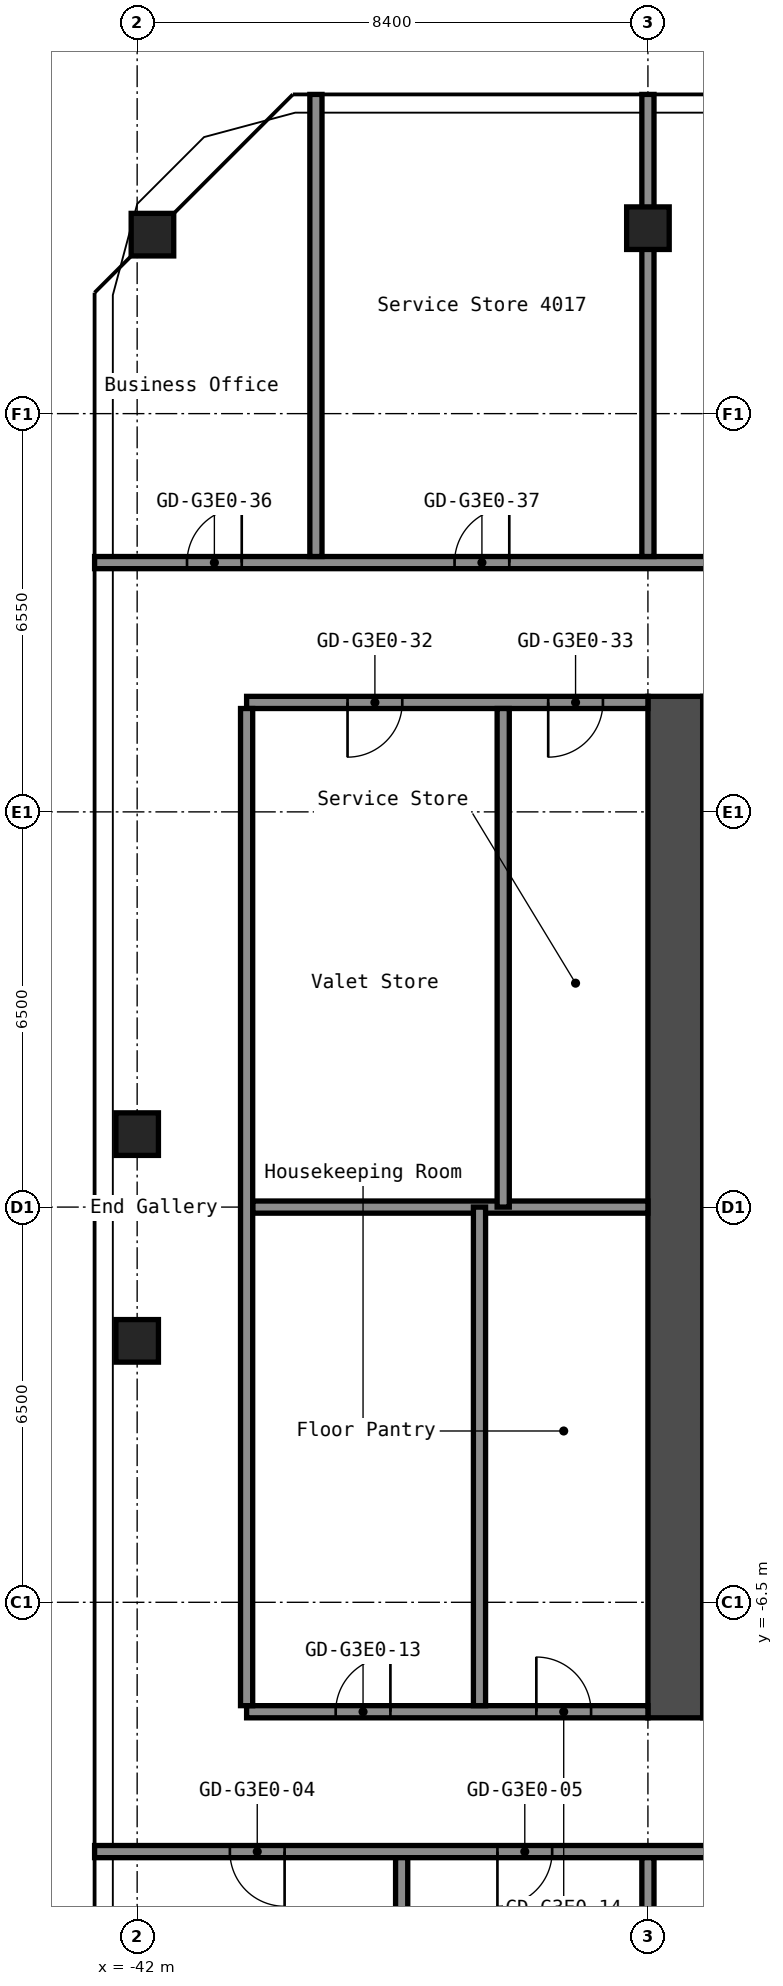
"""IFC4 building model, lengths in metres.
Left out: names, types, materials, properties, quantities, classifications, styles, units other than length and angle.
Written with IfcOpenShell. Run it as: python <this file> out.ifc"""

import sys

from ifc_helpers import new_model, si_unit, direction, frame, frame_2d, origin, origin_2d, place, context, subcontext, project, spatial, rectangle, hollow_rectangle, extrude, element, fill, save


model = new_model("IFC4")
c1 = context("Model", 3, precision=1e-05, world=origin(), true_north=direction((0.0, 1.0)))
c2 = subcontext(c1, "Body", "Model", "MODEL_VIEW")
j1 = project(units=[si_unit("LENGTHUNIT", "METRE"), si_unit("PLANEANGLEUNIT", "RADIAN")], contexts=[c1])
p1 = place(None, origin())
s1 = spatial("IfcSite", under=j1, at=p1, CompositionType="ELEMENT")
p2 = place(p1, origin())
s2 = spatial("IfcBuilding", under=s1, at=p2, CompositionType="ELEMENT")
p3 = place(p2, frame((0.0, 0.0, 143.8)))
s3 = spatial("IfcBuildingStorey", under=s2, at=p3, CompositionType="ELEMENT", Elevation=143.8)
for number, where, z_axis, x_axis in (
    (1, (-42.0, -2.2, 0.0), (0.0, 0.0, 1.0), (1.0, 0.0, 0.0)),
    (2, (-42.0, 1.2, 0.0), (0.0, 0.0, 1.0), (1.0, 0.0, 0.0)),
    (3, (-41.749, 15.994, 0.0), (0.0, 0.0, 1.0), (1.0, 0.0, 0.0)),
    (4, (-33.6, 16.1, 0.0), (0.0, 0.0, 1.0), (1.0, 0.0, 0.0)),
):
    element("IfcColumn", number, at=place(p3, frame(where, z_axis=z_axis, x_axis=x_axis)), inside=s3, PredefinedType="COLUMN", context=c2, shape_type="SweptSolid", body=[
        extrude(hollow_rectangle(XDim=0.7, YDim=0.7, WallThickness=0.028, at=origin_2d()), origin(), (0.0, 0.0, 1.0), 2.75),
    ])
p4 = place(p3, frame((-33.15, -8.4, 0.0), z_axis=(0.0, 0.0, 1.0), x_axis=(0.0, 1.0, 0.0)))
e5 = element("IfcWall", 5, at=p4, inside=s3, PredefinedType="SHEAR", context=c2, shape_type="SweptSolid", body=[
    extrude(rectangle(XDim=16.8, YDim=0.9, at=frame_2d((8.4, 0.0))), origin(), (0.0, 0.0, 1.0), 2.75),
])
p5 = place(p3, frame((-42.7, -10.6, 0.0), z_axis=(0.0, 0.0, 1.0), x_axis=(1.0, 0.0, 0.0)))
e6 = element("IfcWall", 6, at=p5, inside=s3, PredefinedType="PARTITIONING", context=c2, shape_type="SweptSolid", body=[
    extrude(rectangle(XDim=25.9, YDim=0.2, at=frame_2d((12.95, 0.0))), origin(), (0.0, 0.0, 1.0), 2.75),
])
p6 = place(p5, frame((2.225, 0.0, 0.0)))
e7 = element("IfcOpeningElement", 7, at=p6, cuts=e6, PredefinedType="OPENING", context=c2, shape_type="SweptSolid", body=[
    extrude(rectangle(XDim=0.9, YDim=2.1, at=frame_2d((0.45, 1.05))), frame((0.0, 0.11, 0.0), z_axis=(0.0, -1.0, 0.0), x_axis=(1.0, 0.0, 0.0)), (0.0, 0.0, 1.0), 0.22),
])
p7 = place(p5, frame((6.625, 0.0, 0.0)))
e8 = element("IfcOpeningElement", 8, at=p7, cuts=e6, PredefinedType="OPENING", context=c2, shape_type="SweptSolid", body=[
    extrude(rectangle(XDim=0.9, YDim=2.1, at=frame_2d((0.45, 1.05))), frame((0.0, 0.11, 0.0), z_axis=(0.0, -1.0, 0.0), x_axis=(1.0, 0.0, 0.0)), (0.0, 0.0, 1.0), 0.22),
])
p8 = place(p5, frame((11.0, 0.0, 0.0)))
e9 = element("IfcOpeningElement", 9, at=p8, cuts=e6, PredefinedType="OPENING", context=c2, shape_type="SweptSolid", body=[
    extrude(rectangle(XDim=0.9, YDim=2.1, at=frame_2d((0.45, 1.05))), frame((0.0, 0.11, 0.0), z_axis=(0.0, -1.0, 0.0), x_axis=(1.0, 0.0, 0.0)), (0.0, 0.0, 1.0), 0.22),
])
p9 = place(p5, frame((15.2, 0.0, 0.0)))
e10 = element("IfcOpeningElement", 10, at=p9, cuts=e6, PredefinedType="OPENING", context=c2, shape_type="SweptSolid", body=[
    extrude(rectangle(XDim=0.9, YDim=2.1, at=frame_2d((0.45, 1.05))), frame((0.0, 0.11, 0.0), z_axis=(0.0, -1.0, 0.0), x_axis=(1.0, 0.0, 0.0)), (0.0, 0.0, 1.0), 0.22),
])
p10 = place(p5, frame((19.655, 0.0, 0.0)))
e11 = element("IfcOpeningElement", 11, at=p10, cuts=e6, PredefinedType="OPENING", context=c2, shape_type="SweptSolid", body=[
    extrude(rectangle(XDim=0.9, YDim=2.1, at=frame_2d((0.45, 1.05))), frame((0.0, 0.11, 0.0), z_axis=(0.0, -1.0, 0.0), x_axis=(1.0, 0.0, 0.0)), (0.0, 0.0, 1.0), 0.22),
])
p11 = place(p5, frame((23.855, 0.0, 0.0)))
e12 = element("IfcOpeningElement", 12, at=p11, cuts=e6, PredefinedType="OPENING", context=c2, shape_type="SweptSolid", body=[
    extrude(rectangle(XDim=0.9, YDim=2.1, at=frame_2d((0.45, 1.05))), frame((0.0, 0.11, 0.0), z_axis=(0.0, -1.0, 0.0), x_axis=(1.0, 0.0, 0.0)), (0.0, 0.0, 1.0), 0.22),
])
p12 = place(p3, frame((-40.2, -8.3, 0.0), z_axis=(0.0, 0.0, 1.0), x_axis=(1.0, 0.0, 0.0)))
e13 = element("IfcWall", 13, at=p12, inside=s3, PredefinedType="PARTITIONING", context=c2, shape_type="SweptSolid", body=[
    extrude(rectangle(XDim=6.6, YDim=0.2, at=frame_2d((3.3, 0.0))), origin(), (0.0, 0.0, 1.0), 2.75),
])
p13 = place(p12, frame((1.465, 0.0, 0.0)))
e14 = element("IfcOpeningElement", 14, at=p13, cuts=e13, PredefinedType="OPENING", context=c2, shape_type="SweptSolid", body=[
    extrude(rectangle(XDim=0.9, YDim=2.1, at=frame_2d((0.45, 1.05))), frame((0.0, 0.11, 0.0), z_axis=(0.0, -1.0, 0.0), x_axis=(1.0, 0.0, 0.0)), (0.0, 0.0, 1.0), 0.22),
])
p14 = place(p12, frame((4.765, 0.0, 0.0)))
e15 = element("IfcOpeningElement", 15, at=p14, cuts=e13, PredefinedType="OPENING", context=c2, shape_type="SweptSolid", body=[
    extrude(rectangle(XDim=0.9, YDim=2.1, at=frame_2d((0.45, 1.05))), frame((0.0, 0.11, 0.0), z_axis=(0.0, -1.0, 0.0), x_axis=(1.0, 0.0, 0.0)), (0.0, 0.0, 1.0), 0.22),
])
p15 = place(p3, frame((-40.1, 0.0, 0.0), z_axis=(0.0, 0.0, 1.0), x_axis=(1.0, 0.0, 0.0)))
e16 = element("IfcWall", 16, at=p15, inside=s3, PredefinedType="PARTITIONING", context=c2, shape_type="SweptSolid", body=[
    extrude(rectangle(XDim=6.5, YDim=0.2, at=frame_2d((3.25, 0.0))), origin(), (0.0, 0.0, 1.0), 2.75),
])
p16 = place(p3, frame((-40.2, 8.3, 0.0), z_axis=(0.0, 0.0, 1.0), x_axis=(1.0, 0.0, 0.0)))
e17 = element("IfcWall", 17, at=p16, inside=s3, PredefinedType="PARTITIONING", context=c2, shape_type="SweptSolid", body=[
    extrude(rectangle(XDim=6.6, YDim=0.2, at=frame_2d((3.3, 0.0))), origin(), (0.0, 0.0, 1.0), 2.75),
])
p17 = place(p16, frame((1.66, 0.0, 0.0)))
e18 = element("IfcOpeningElement", 18, at=p17, cuts=e17, PredefinedType="OPENING", context=c2, shape_type="SweptSolid", body=[
    extrude(rectangle(XDim=0.9, YDim=2.1, at=frame_2d((0.45, 1.05))), frame((0.0, 0.11, 0.0), z_axis=(0.0, -1.0, 0.0), x_axis=(1.0, 0.0, 0.0)), (0.0, 0.0, 1.0), 0.22),
])
p18 = place(p16, frame((4.96, 0.0, 0.0)))
e19 = element("IfcOpeningElement", 19, at=p18, cuts=e17, PredefinedType="OPENING", context=c2, shape_type="SweptSolid", body=[
    extrude(rectangle(XDim=0.9, YDim=2.1, at=frame_2d((0.45, 1.05))), frame((0.0, 0.11, 0.0), z_axis=(0.0, -1.0, 0.0), x_axis=(1.0, 0.0, 0.0)), (0.0, 0.0, 1.0), 0.22),
])
p19 = place(p3, frame((-42.7, 10.6, 0.0), z_axis=(0.0, 0.0, 1.0), x_axis=(1.0, 0.0, 0.0)))
e20 = element("IfcWall", 20, at=p19, inside=s3, PredefinedType="PARTITIONING", context=c2, shape_type="SweptSolid", body=[
    extrude(rectangle(XDim=25.9, YDim=0.2, at=frame_2d((12.95, 0.0))), origin(), (0.0, 0.0, 1.0), 2.75),
])
p20 = place(p19, frame((1.52, 0.0, 0.0)))
e21 = element("IfcOpeningElement", 21, at=p20, cuts=e20, PredefinedType="OPENING", context=c2, shape_type="SweptSolid", body=[
    extrude(rectangle(XDim=0.9, YDim=2.1, at=frame_2d((0.45, 1.05))), frame((0.0, 0.11, 0.0), z_axis=(0.0, -1.0, 0.0), x_axis=(1.0, 0.0, 0.0)), (0.0, 0.0, 1.0), 0.22),
])
p21 = place(p19, frame((5.92, 0.0, 0.0)))
e22 = element("IfcOpeningElement", 22, at=p21, cuts=e20, PredefinedType="OPENING", context=c2, shape_type="SweptSolid", body=[
    extrude(rectangle(XDim=0.9, YDim=2.1, at=frame_2d((0.45, 1.05))), frame((0.0, 0.11, 0.0), z_axis=(0.0, -1.0, 0.0), x_axis=(1.0, 0.0, 0.0)), (0.0, 0.0, 1.0), 0.22),
])
p22 = place(p19, frame((12.8, 0.0, 0.0)))
e23 = element("IfcOpeningElement", 23, at=p22, cuts=e20, PredefinedType="OPENING", context=c2, shape_type="SweptSolid", body=[
    extrude(rectangle(XDim=1.0, YDim=2.1, at=frame_2d((0.5, 1.05))), frame((0.0, 0.11, 0.0), z_axis=(0.0, -1.0, 0.0), x_axis=(1.0, 0.0, 0.0)), (0.0, 0.0, 1.0), 0.22),
])
p23 = place(p19, frame((21.2, 0.0, 0.0)))
e24 = element("IfcOpeningElement", 24, at=p23, cuts=e20, PredefinedType="OPENING", context=c2, shape_type="SweptSolid", body=[
    extrude(rectangle(XDim=1.0, YDim=2.1, at=frame_2d((0.5, 1.05))), frame((0.0, 0.11, 0.0), z_axis=(0.0, -1.0, 0.0), x_axis=(1.0, 0.0, 0.0)), (0.0, 0.0, 1.0), 0.22),
])
p24 = place(p3, frame((-40.2, -8.2, 0.0), z_axis=(0.0, 0.0, 1.0), x_axis=(0.0, 1.0, 0.0)))
e25 = element("IfcWall", 25, at=p24, inside=s3, PredefinedType="PARTITIONING", context=c2, shape_type="SweptSolid", body=[
    extrude(rectangle(XDim=16.4, YDim=0.2, at=frame_2d((8.2, 0.0))), origin(), (0.0, 0.0, 1.0), 2.75),
])
p25 = place(p3, frame((-39.06, 10.7, 0.0), z_axis=(0.0, 0.0, 1.0), x_axis=(0.0, 1.0, 0.0)))
e26 = element("IfcWall", 26, at=p25, inside=s3, PredefinedType="PARTITIONING", context=c2, shape_type="SweptSolid", body=[
    extrude(rectangle(XDim=7.6, YDim=0.2, at=frame_2d((3.8, 0.0))), origin(), (0.0, 0.0, 1.0), 2.75),
])
p26 = place(p3, frame((-37.65, -19.3, 0.0), z_axis=(0.0, 0.0, 1.0), x_axis=(0.0, 1.0, 0.0)))
e27 = element("IfcWall", 27, at=p26, inside=s3, PredefinedType="PARTITIONING", context=c2, shape_type="SweptSolid", body=[
    extrude(rectangle(XDim=8.6, YDim=0.2, at=frame_2d((4.3, 0.0))), origin(), (0.0, 0.0, 1.0), 2.75),
])
for number, where, z_axis, x_axis in (
    (28, (-36.37, -8.2, 0.0), (0.0, 0.0, 1.0), (0.0, 1.0, 0.0)),
    (29, (-35.98, 0.0, 0.0), (0.0, 0.0, 1.0), (0.0, 1.0, 0.0)),
):
    element("IfcWall", number, at=place(p3, frame(where, z_axis=z_axis, x_axis=x_axis)), inside=s3, PredefinedType="PARTITIONING", context=c2, shape_type="SweptSolid", body=[
        extrude(rectangle(XDim=8.2, YDim=0.2, at=frame_2d((4.1, 0.0))), origin(), (0.0, 0.0, 1.0), 2.75),
    ])
p27 = place(p3, frame((-33.6, -19.3, 0.0), z_axis=(0.0, 0.0, 1.0), x_axis=(0.0, 1.0, 0.0)))
e30 = element("IfcWall", 30, at=p27, inside=s3, PredefinedType="PARTITIONING", context=c2, shape_type="SweptSolid", body=[
    extrude(rectangle(XDim=8.6, YDim=0.2, at=frame_2d((4.3, 0.0))), origin(), (0.0, 0.0, 1.0), 2.75),
])
p28 = place(p3, frame((-33.6, 10.7, 0.0), z_axis=(0.0, 0.0, 1.0), x_axis=(0.0, 1.0, 0.0)))
e31 = element("IfcWall", 31, at=p28, inside=s3, PredefinedType="PARTITIONING", context=c2, shape_type="SweptSolid", body=[
    extrude(rectangle(XDim=7.6, YDim=0.2, at=frame_2d((3.8, 0.0))), origin(), (0.0, 0.0, 1.0), 2.75),
])
p29 = place(p6, origin())
e32 = element("IfcDoor", 32, at=p29, inside=s3, OperationType="SINGLE_SWING_RIGHT", PredefinedType="DOOR", context=c2, shape_type="SweptSolid", body=[
    extrude(rectangle(XDim=0.9, YDim=2.1, at=frame_2d((0.45, 1.05))), frame((0.0, 0.025, 0.0), z_axis=(0.0, -1.0, 0.0), x_axis=(1.0, 0.0, 0.0)), (0.0, 0.0, 1.0), 0.05),
])
fill(e7, e32)
p30 = place(p7, origin())
e33 = element("IfcDoor", 33, at=p30, inside=s3, OperationType="SINGLE_SWING_LEFT", PredefinedType="DOOR", context=c2, shape_type="SweptSolid", body=[
    extrude(rectangle(XDim=0.9, YDim=2.1, at=frame_2d((0.45, 1.05))), frame((0.0, 0.025, 0.0), z_axis=(0.0, -1.0, 0.0), x_axis=(1.0, 0.0, 0.0)), (0.0, 0.0, 1.0), 0.05),
])
fill(e8, e33)
p31 = place(p13, origin())
e34 = element("IfcDoor", 34, at=p31, inside=s3, OperationType="SINGLE_SWING_LEFT", PredefinedType="DOOR", context=c2, shape_type="SweptSolid", body=[
    extrude(rectangle(XDim=0.9, YDim=2.1, at=frame_2d((0.45, 1.05))), frame((0.0, 0.025, 0.0), z_axis=(0.0, -1.0, 0.0), x_axis=(1.0, 0.0, 0.0)), (0.0, 0.0, 1.0), 0.05),
])
fill(e14, e34)
p32 = place(p14, origin())
e35 = element("IfcDoor", 35, at=p32, inside=s3, OperationType="SINGLE_SWING_RIGHT", PredefinedType="DOOR", context=c2, shape_type="SweptSolid", body=[
    extrude(rectangle(XDim=0.9, YDim=2.1, at=frame_2d((0.45, 1.05))), frame((0.0, 0.025, 0.0), z_axis=(0.0, -1.0, 0.0), x_axis=(1.0, 0.0, 0.0)), (0.0, 0.0, 1.0), 0.05),
])
fill(e15, e35)
p33 = place(p17, origin())
e36 = element("IfcDoor", 36, at=p33, inside=s3, OperationType="SINGLE_SWING_LEFT", PredefinedType="DOOR", context=c2, shape_type="SweptSolid", body=[
    extrude(rectangle(XDim=0.9, YDim=2.1, at=frame_2d((0.45, 1.05))), frame((0.0, 0.025, 0.0), z_axis=(0.0, -1.0, 0.0), x_axis=(1.0, 0.0, 0.0)), (0.0, 0.0, 1.0), 0.05),
])
fill(e18, e36)
p34 = place(p18, origin())
e37 = element("IfcDoor", 37, at=p34, inside=s3, OperationType="SINGLE_SWING_LEFT", PredefinedType="DOOR", context=c2, shape_type="SweptSolid", body=[
    extrude(rectangle(XDim=0.9, YDim=2.1, at=frame_2d((0.45, 1.05))), frame((0.0, 0.025, 0.0), z_axis=(0.0, -1.0, 0.0), x_axis=(1.0, 0.0, 0.0)), (0.0, 0.0, 1.0), 0.05),
])
fill(e19, e37)
p35 = place(p20, origin())
e38 = element("IfcDoor", 38, at=p35, inside=s3, OperationType="SINGLE_SWING_LEFT", PredefinedType="DOOR", context=c2, shape_type="SweptSolid", body=[
    extrude(rectangle(XDim=0.9, YDim=2.1, at=frame_2d((0.45, 1.05))), frame((0.0, 0.025, 0.0), z_axis=(0.0, -1.0, 0.0), x_axis=(1.0, 0.0, 0.0)), (0.0, 0.0, 1.0), 0.05),
])
fill(e21, e38)
p36 = place(p21, origin())
e39 = element("IfcDoor", 39, at=p36, inside=s3, OperationType="SINGLE_SWING_LEFT", PredefinedType="DOOR", context=c2, shape_type="SweptSolid", body=[
    extrude(rectangle(XDim=0.9, YDim=2.1, at=frame_2d((0.45, 1.05))), frame((0.0, 0.025, 0.0), z_axis=(0.0, -1.0, 0.0), x_axis=(1.0, 0.0, 0.0)), (0.0, 0.0, 1.0), 0.05),
])
fill(e22, e39)
save(model, sys.argv[1])
